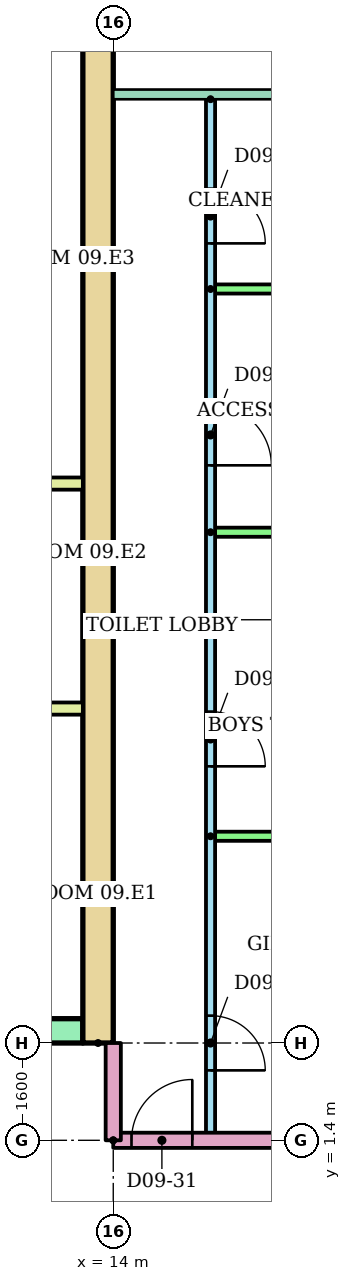
"""IFC4 building model, lengths in metres.
Left out: names, types, materials, properties, quantities, classifications, styles, units other than length and angle.
Written with IfcOpenShell. Run it as: python <this file> out.ifc"""

import sys

from ifc_helpers import new_model, si_unit, direction, frame, frame_2d, origin, place, context, subcontext, project, spatial, rectangle, extrude, element, fill, save


model = new_model("IFC4")
c1 = context("Model", 3, precision=1e-05, world=origin(), true_north=direction((0.0, 1.0)))
c2 = subcontext(c1, "Body", "Model", "MODEL_VIEW")
j1 = project(units=[si_unit("LENGTHUNIT", "METRE"), si_unit("PLANEANGLEUNIT", "RADIAN")], contexts=[c1])
p1 = place(None, origin())
s1 = spatial("IfcSite", under=j1, at=p1, CompositionType="ELEMENT")
p2 = place(p1, origin())
s2 = spatial("IfcBuilding", under=s1, at=p2, CompositionType="ELEMENT")
p3 = place(p2, frame((0.0, 0.0, 37.7)))
s3 = spatial("IfcBuildingStorey", under=s2, at=p3, CompositionType="ELEMENT", Elevation=37.7)
p4 = place(p3, frame((13.75, 3.0, 0.0), z_axis=(0.0, 0.0, 1.0), x_axis=(0.0, 1.0, 0.0)))
e1 = element("IfcWall", 1, at=p4, inside=s3, PredefinedType="SHEAR", context=c2, shape_type="SweptSolid", body=[
    extrude(rectangle(XDim=17.0, YDim=0.5, at=frame_2d((8.5, 0.0))), origin(), (0.0, 0.0, 1.0), 3.62),
])
p5 = place(p3, frame((-13.5, 3.2, 0.0)))
e2 = element("IfcWall", 2, at=p5, inside=s3, PredefinedType="SHEAR", context=c2, shape_type="SweptSolid", body=[
    extrude(rectangle(XDim=27.0, YDim=0.4, at=frame_2d((13.5, 0.0))), origin(), (0.0, 0.0, 1.0), 3.62),
])
p6 = place(p5, frame((6.861, 0.0, 0.0)))
e3 = element("IfcOpeningElement", 3, at=p6, cuts=e2, PredefinedType="OPENING", context=c2, shape_type="SweptSolid", body=[
    extrude(rectangle(XDim=1.1, YDim=2.1, at=frame_2d((0.55, 1.05))), frame((0.0, 0.21, 0.0), z_axis=(0.0, -1.0, 0.0), x_axis=(1.0, 0.0, 0.0)), (0.0, 0.0, 1.0), 0.42),
])
p7 = place(p5, frame((9.906, 0.0, 0.0)))
e4 = element("IfcOpeningElement", 4, at=p7, cuts=e2, PredefinedType="OPENING", context=c2, shape_type="SweptSolid", body=[
    extrude(rectangle(XDim=1.1, YDim=2.1, at=frame_2d((0.55, 1.05))), frame((0.0, 0.21, 0.0), z_axis=(0.0, -1.0, 0.0), x_axis=(1.0, 0.0, 0.0)), (0.0, 0.0, 1.0), 0.42),
])
p8 = place(p5, frame((15.994, 0.0, 0.0)))
e5 = element("IfcOpeningElement", 5, at=p8, cuts=e2, PredefinedType="OPENING", context=c2, shape_type="SweptSolid", body=[
    extrude(rectangle(XDim=1.1, YDim=2.1, at=frame_2d((0.55, 1.05))), frame((0.0, 0.21, 0.0), z_axis=(0.0, -1.0, 0.0), x_axis=(1.0, 0.0, 0.0)), (0.0, 0.0, 1.0), 0.42),
])
p9 = place(p5, frame((19.039, 0.0, 0.0)))
e6 = element("IfcOpeningElement", 6, at=p9, cuts=e2, PredefinedType="OPENING", context=c2, shape_type="SweptSolid", body=[
    extrude(rectangle(XDim=1.1, YDim=2.1, at=frame_2d((0.55, 1.05))), frame((0.0, 0.21, 0.0), z_axis=(0.0, -1.0, 0.0), x_axis=(1.0, 0.0, 0.0)), (0.0, 0.0, 1.0), 0.42),
])
p10 = place(p5, frame((12.6, 0.0, 0.0)))
e7 = element("IfcOpeningElement", 7, at=p10, cuts=e2, PredefinedType="OPENING", context=c2, shape_type="SweptSolid", body=[
    extrude(rectangle(XDim=1.8, YDim=2.1, at=frame_2d((0.9, 1.05))), frame((0.0, 0.21, 0.0), z_axis=(0.0, -1.0, 0.0), x_axis=(1.0, 0.0, 0.0)), (0.0, 0.0, 1.0), 0.42),
])
for number, where in (
    (8, (9.6, 8.5, 0.0)),
    (9, (9.6, 12.2, 0.0)),
):
    element("IfcWall", number, at=place(p3, frame(where)), inside=s3, PredefinedType="PARTITIONING", context=c2, shape_type="SweptSolid", body=[
        extrude(rectangle(XDim=3.9, YDim=0.2, at=frame_2d((1.95, 0.0))), origin(), (0.0, 0.0, 1.0), 3.62),
    ])
p11 = place(p3, frame((14.0, 1.4, 0.0)))
e10 = element("IfcWall", 10, at=p11, inside=s3, PredefinedType="PARTITIONING", context=c2, shape_type="SweptSolid", body=[
    extrude(rectangle(XDim=15.0, YDim=0.25, at=frame_2d((7.5, 0.0))), origin(), (0.0, 0.0, 1.0), 3.1),
])
p12 = place(p11, frame((0.3, 0.0, 0.0)))
e11 = element("IfcOpeningElement", 11, at=p12, cuts=e10, PredefinedType="OPENING", context=c2, shape_type="SweptSolid", body=[
    extrude(rectangle(XDim=1.0, YDim=2.1, at=frame_2d((0.5, 1.05))), frame((0.0, 0.135, 0.0), z_axis=(0.0, -1.0, 0.0), x_axis=(1.0, 0.0, 0.0)), (0.0, 0.0, 1.0), 0.27),
])
p13 = place(p11, frame((9.5, 0.0, 0.0)))
e12 = element("IfcOpeningElement", 12, at=p13, cuts=e10, PredefinedType="OPENING", context=c2, shape_type="SweptSolid", body=[
    extrude(rectangle(XDim=1.0, YDim=2.1, at=frame_2d((0.5, 1.05))), frame((0.0, 0.135, 0.0), z_axis=(0.0, -1.0, 0.0), x_axis=(1.0, 0.0, 0.0)), (0.0, 0.0, 1.0), 0.27),
])
p14 = place(p11, frame((13.5, 0.0, 0.0)))
e13 = element("IfcOpeningElement", 13, at=p14, cuts=e10, PredefinedType="OPENING", context=c2, shape_type="SweptSolid", body=[
    extrude(rectangle(XDim=1.0, YDim=2.1, at=frame_2d((0.5, 1.05))), frame((0.0, 0.135, 0.0), z_axis=(0.0, -1.0, 0.0), x_axis=(1.0, 0.0, 0.0)), (0.0, 0.0, 1.0), 0.27),
])
p15 = place(p3, frame((15.6, 18.521, 0.0), z_axis=(0.0, 0.0, 1.0), x_axis=(0.0, -1.0, 0.0)))
e14 = element("IfcWall", 14, at=p15, inside=s3, PredefinedType="PARTITIONING", context=c2, shape_type="SweptSolid", body=[
    extrude(rectangle(XDim=17.121, YDim=0.15, at=frame_2d((8.561, 0.0))), origin(), (0.0, 0.0, 1.0), 3.1),
])
p16 = place(p15, frame((15.071, 0.0, 0.0)))
e15 = element("IfcOpeningElement", 15, at=p16, cuts=e14, PredefinedType="OPENING", context=c2, shape_type="SweptSolid", body=[
    extrude(rectangle(XDim=0.9, YDim=2.1, at=frame_2d((0.45, 1.05))), frame((0.0, 0.085, 0.0), z_axis=(0.0, -1.0, 0.0), x_axis=(1.0, 0.0, 0.0)), (0.0, 0.0, 1.0), 0.17),
])
p17 = place(p15, frame((10.071, 0.0, 0.0)))
e16 = element("IfcOpeningElement", 16, at=p17, cuts=e14, PredefinedType="OPENING", context=c2, shape_type="SweptSolid", body=[
    extrude(rectangle(XDim=0.9, YDim=2.1, at=frame_2d((0.45, 1.05))), frame((0.0, 0.085, 0.0), z_axis=(0.0, -1.0, 0.0), x_axis=(1.0, 0.0, 0.0)), (0.0, 0.0, 1.0), 0.17),
])
p18 = place(p15, frame((5.021, 0.0, 0.0)))
e17 = element("IfcOpeningElement", 17, at=p18, cuts=e14, PredefinedType="OPENING", context=c2, shape_type="SweptSolid", body=[
    extrude(rectangle(XDim=1.0, YDim=2.1, at=frame_2d((0.5, 1.05))), frame((0.0, 0.085, 0.0), z_axis=(0.0, -1.0, 0.0), x_axis=(1.0, 0.0, 0.0)), (0.0, 0.0, 1.0), 0.17),
])
p19 = place(p15, frame((1.471, 0.0, 0.0)))
e18 = element("IfcOpeningElement", 18, at=p19, cuts=e14, PredefinedType="OPENING", context=c2, shape_type="SweptSolid", body=[
    extrude(rectangle(XDim=0.9, YDim=2.1, at=frame_2d((0.45, 1.05))), frame((0.0, 0.085, 0.0), z_axis=(0.0, -1.0, 0.0), x_axis=(1.0, 0.0, 0.0)), (0.0, 0.0, 1.0), 0.17),
])
for number, where in (
    (19, (15.6, 6.4, 0.0)),
    (20, (15.6, 11.4, 0.0)),
    (21, (15.6, 15.4, 0.0)),
):
    element("IfcWall", number, at=place(p3, frame(where)), inside=s3, PredefinedType="PARTITIONING", context=c2, shape_type="SweptSolid", body=[
        extrude(rectangle(XDim=2.4, YDim=0.15, at=frame_2d((1.2, 0.0))), origin(), (0.0, 0.0, 1.0), 3.1),
    ])
p20 = place(p3, frame((14.0, 1.4, 0.0), z_axis=(0.0, 0.0, 1.0), x_axis=(0.0, 1.0, 0.0)))
e22 = element("IfcWall", 22, at=p20, inside=s3, PredefinedType="PARTITIONING", context=c2, shape_type="SweptSolid", body=[
    extrude(rectangle(XDim=1.6, YDim=0.25, at=frame_2d((0.8, 0.0))), origin(), (0.0, 0.0, 1.0), 3.1),
])
p21 = place(p16, origin())
e23 = element("IfcDoor", 23, at=p21, inside=s3, OperationType="SINGLE_SWING_RIGHT", PredefinedType="DOOR", context=c2, shape_type="SweptSolid", body=[
    extrude(rectangle(XDim=0.9, YDim=2.1, at=frame_2d((0.45, 1.05))), frame((0.0, 0.025, 0.0), z_axis=(0.0, -1.0, 0.0), x_axis=(1.0, 0.0, 0.0)), (0.0, 0.0, 1.0), 0.05),
])
fill(e15, e23)
p22 = place(p17, origin())
e24 = element("IfcDoor", 24, at=p22, inside=s3, OperationType="SINGLE_SWING_RIGHT", PredefinedType="DOOR", context=c2, shape_type="SweptSolid", body=[
    extrude(rectangle(XDim=0.9, YDim=2.1, at=frame_2d((0.45, 1.05))), frame((0.0, 0.025, 0.0), z_axis=(0.0, -1.0, 0.0), x_axis=(1.0, 0.0, 0.0)), (0.0, 0.0, 1.0), 0.05),
])
fill(e16, e24)
p23 = place(p18, origin())
e25 = element("IfcDoor", 25, at=p23, inside=s3, OperationType="SINGLE_SWING_RIGHT", PredefinedType="DOOR", context=c2, shape_type="SweptSolid", body=[
    extrude(rectangle(XDim=1.0, YDim=2.1, at=frame_2d((0.5, 1.05))), frame((0.0, 0.025, 0.0), z_axis=(0.0, -1.0, 0.0), x_axis=(1.0, 0.0, 0.0)), (0.0, 0.0, 1.0), 0.05),
])
fill(e17, e25)
p24 = place(p19, origin())
e26 = element("IfcDoor", 26, at=p24, inside=s3, OperationType="SINGLE_SWING_RIGHT", PredefinedType="DOOR", context=c2, shape_type="SweptSolid", body=[
    extrude(rectangle(XDim=0.9, YDim=2.1, at=frame_2d((0.45, 1.05))), frame((0.0, 0.025, 0.0), z_axis=(0.0, -1.0, 0.0), x_axis=(1.0, 0.0, 0.0)), (0.0, 0.0, 1.0), 0.05),
])
fill(e18, e26)
p25 = place(p12, origin())
e27 = element("IfcDoor", 27, at=p25, inside=s3, OperationType="SINGLE_SWING_RIGHT", PredefinedType="DOOR", context=c2, shape_type="SweptSolid", body=[
    extrude(rectangle(XDim=1.0, YDim=2.1, at=frame_2d((0.5, 1.05))), frame((0.0, 0.025, 0.0), z_axis=(0.0, -1.0, 0.0), x_axis=(1.0, 0.0, 0.0)), (0.0, 0.0, 1.0), 0.05),
])
fill(e11, e27)
save(model, sys.argv[1])
